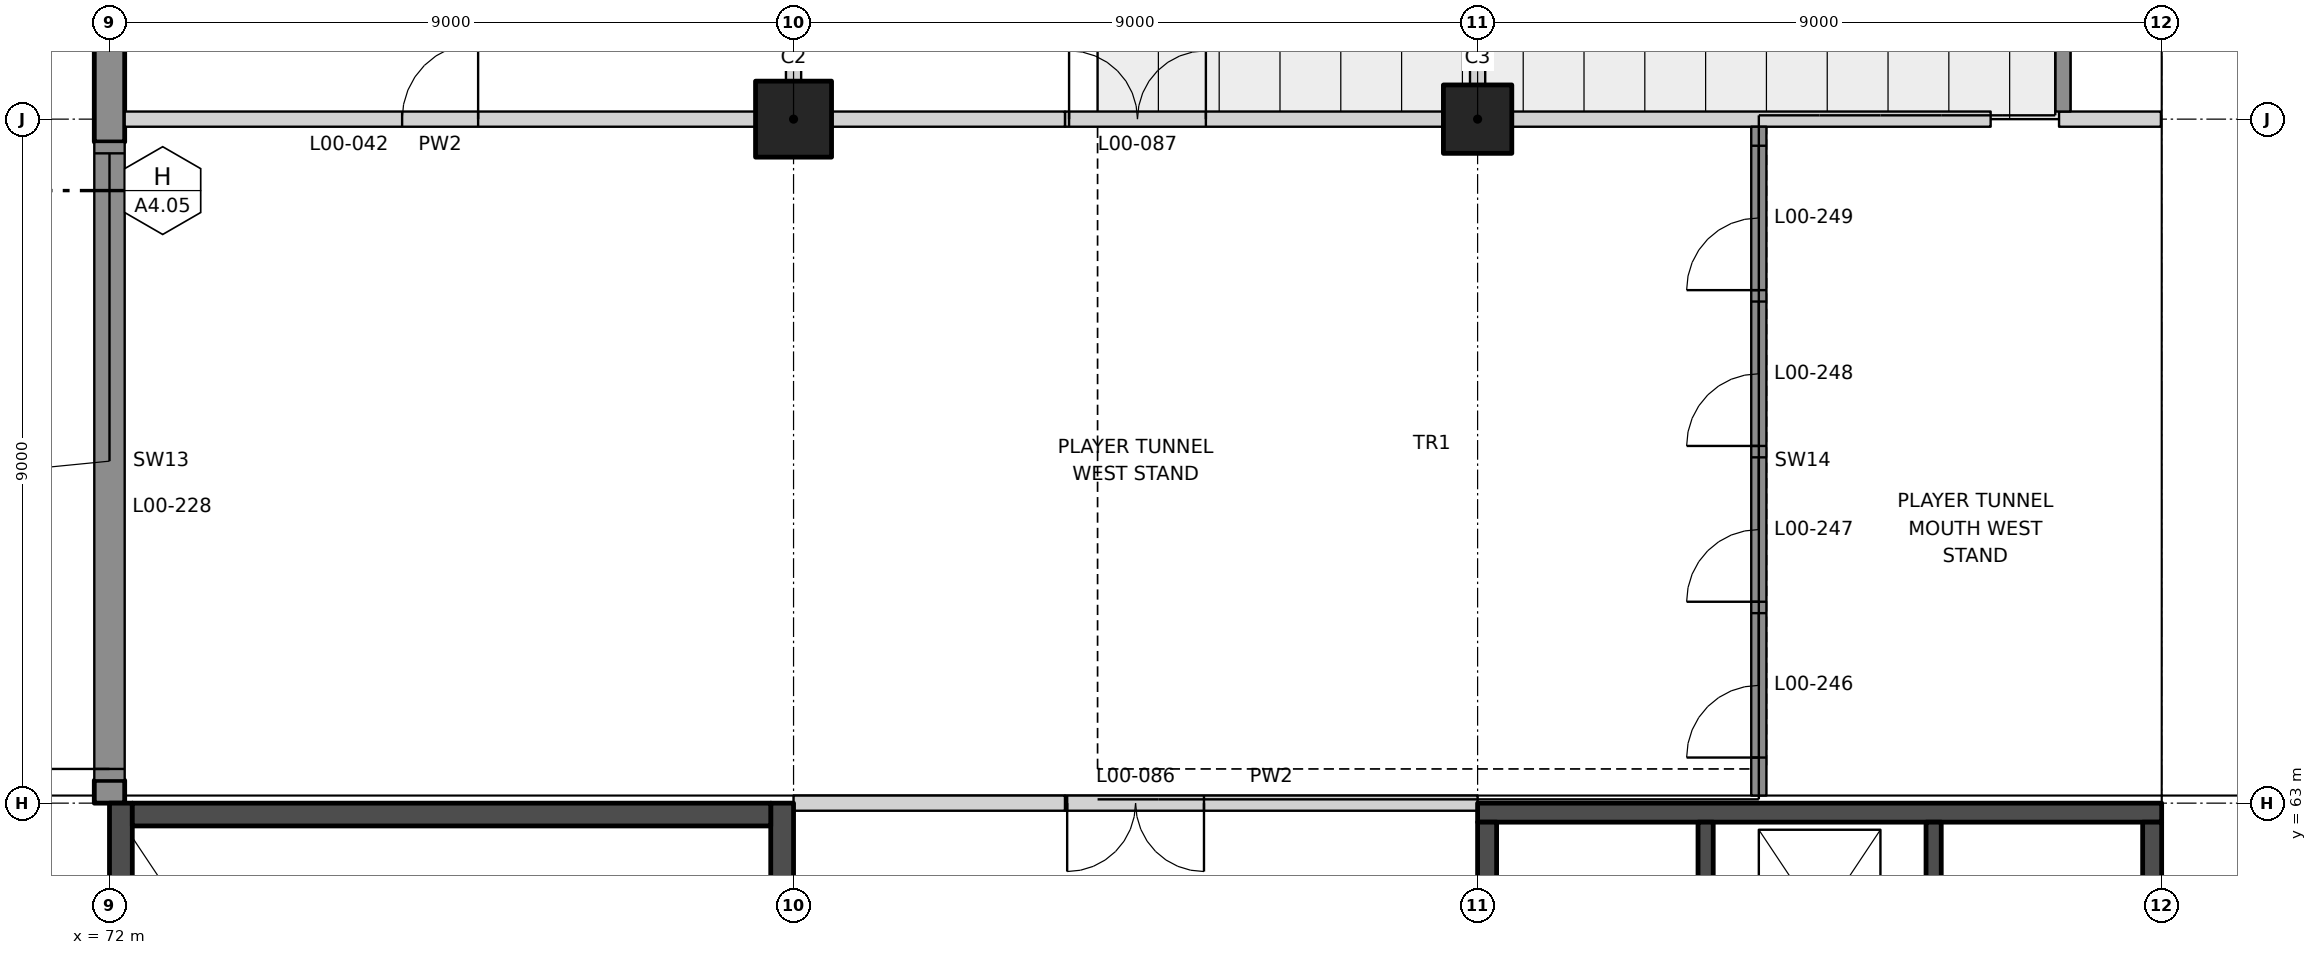
"""IFC4 building model, lengths in metres.
Left out: names, types, materials, properties, quantities, classifications, styles, units other than length and angle.
Written with IfcOpenShell. Run it as: python <this file> out.ifc"""

import sys

from ifc_helpers import new_model, si_unit, direction, frame, frame_2d, origin, origin_2d, place, context, subcontext, project, spatial, polyline, rectangle, outline, extrude, element, fill, save


model = new_model("IFC4")
c1 = context("Model", 3, precision=1e-05, world=origin(), true_north=direction((0.0, 1.0)))
c2 = subcontext(c1, "Body", "Model", "MODEL_VIEW")
j1 = project(units=[si_unit("LENGTHUNIT", "METRE"), si_unit("PLANEANGLEUNIT", "RADIAN")], contexts=[c1])
p1 = place(None, origin())
s1 = spatial("IfcSite", under=j1, at=p1, CompositionType="ELEMENT")
p2 = place(p1, origin())
s2 = spatial("IfcBuilding", under=s1, at=p2, CompositionType="ELEMENT")
p3 = place(p2, origin())
s3 = spatial("IfcBuildingStorey", under=s2, at=p3, CompositionType="ELEMENT", Elevation=0.0)
p4 = place(p3, frame((90.0, 72.0, 0.0), z_axis=(0.0, 0.0, 1.0), x_axis=(1.0, 0.0, 0.0)))
e1 = element("IfcColumn", 1, at=p4, inside=s3, PredefinedType="COLUMN", context=c2, shape_type="SweptSolid", body=[
    extrude(rectangle(XDim=0.9, YDim=0.9, at=origin_2d()), origin(), (0.0, 0.0, 1.0), 3.552),
])
p5 = place(p3, frame((81.0, 72.0, 0.0), z_axis=(0.0, 0.0, 1.0), x_axis=(1.0, 0.0, 0.0)))
e2 = element("IfcColumn", 2, at=p5, inside=s3, PredefinedType="COLUMN", context=c2, shape_type="SweptSolid", body=[
    extrude(rectangle(XDim=1.0, YDim=1.0, at=origin_2d()), origin(), (0.0, 0.0, 1.0), 7.0),
])
p6 = place(p3, frame((72.0, 99.0, 0.0), z_axis=(0.0, 0.0, 1.0), x_axis=(0.0, -1.0, 0.0)))
e3 = element("IfcWall", 3, at=p6, inside=s3, PredefinedType="SOLIDWALL", context=c2, shape_type="SweptSolid", body=[
    extrude(rectangle(XDim=27.3, YDim=0.4, at=frame_2d((13.65, 0.0))), origin(), (0.0, 0.0, 1.0), 7.0),
])
p7 = place(p3, frame((72.0, 63.3, 0.0), z_axis=(0.0, 0.0, 1.0), x_axis=(0.0, -1.0, 0.0)))
e4 = element("IfcWall", 4, at=p7, inside=s3, PredefinedType="SOLIDWALL", context=c2, shape_type="SweptSolid", body=[
    extrude(rectangle(XDim=0.3, YDim=0.4, at=frame_2d((0.15, 0.0))), origin(), (0.0, 0.0, 1.0), 7.0),
])
p8 = place(p3, frame((84.571, 63.0, 0.0), z_axis=(0.0, 0.0, 1.0), x_axis=(1.0, 0.0, 0.0)))
e5 = element("IfcWall", 5, at=p8, inside=s3, PredefinedType="PARTITIONING", context=c2, shape_type="SweptSolid", body=[
    extrude(rectangle(XDim=5.429, YDim=0.2, at=frame_2d((2.714, 0.0))), origin(), (0.0, 0.0, 1.0), 3.439),
])
p9 = place(p8, frame((0.029, 0.0, 0.0)))
e6 = element("IfcOpeningElement", 6, at=p9, cuts=e5, PredefinedType="OPENING", context=c2, shape_type="SweptSolid", body=[
    extrude(rectangle(XDim=1.8, YDim=2.1, at=frame_2d((0.9, 1.05))), frame((0.0, 0.11, 0.0), z_axis=(0.0, -1.0, 0.0), x_axis=(1.0, 0.0, 0.0)), (0.0, 0.0, 1.0), 0.22),
])
p10 = place(p3, frame((72.2, 72.0, 0.0), z_axis=(0.0, 0.0, 1.0), x_axis=(1.0, 0.0, 0.0)))
e7 = element("IfcWall", 7, at=p10, inside=s3, PredefinedType="PARTITIONING", context=c2, shape_type="SweptSolid", body=[
    extrude(rectangle(XDim=8.3, YDim=0.2, at=frame_2d((4.15, 0.0))), origin(), (0.0, 0.0, 1.0), 5.75),
])
p11 = place(p10, frame((3.65, 0.0, 0.0)))
e8 = element("IfcOpeningElement", 8, at=p11, cuts=e7, PredefinedType="OPENING", context=c2, shape_type="SweptSolid", body=[
    extrude(rectangle(XDim=1.0, YDim=2.1, at=frame_2d((0.5, 1.05))), frame((0.0, 0.11, 0.0), z_axis=(0.0, -1.0, 0.0), x_axis=(1.0, 0.0, 0.0)), (0.0, 0.0, 1.0), 0.22),
])
p12 = place(p3, frame((84.571, 72.0, 0.0), z_axis=(0.0, 0.0, 1.0), x_axis=(1.0, 0.0, 0.0)))
e9 = element("IfcWall", 9, at=p12, inside=s3, PredefinedType="PARTITIONING", context=c2, shape_type="SweptSolid", body=[
    extrude(rectangle(XDim=4.979, YDim=0.2, at=frame_2d((2.49, 0.0))), origin(), (0.0, 0.0, 1.0), 3.439),
])
p13 = place(p12, frame((0.054, 0.0, 0.0)))
e10 = element("IfcOpeningElement", 10, at=p13, cuts=e9, PredefinedType="OPENING", context=c2, shape_type="SweptSolid", body=[
    extrude(rectangle(XDim=1.8, YDim=2.1, at=frame_2d((0.9, 1.05))), frame((0.0, 0.11, 0.0), z_axis=(0.0, -1.0, 0.0), x_axis=(1.0, 0.0, 0.0)), (0.0, 0.0, 1.0), 0.22),
])
p14 = place(p3, frame((97.65, 72.0, 0.0), z_axis=(0.0, 0.0, 1.0), x_axis=(1.0, 0.0, 0.0)))
e11 = element("IfcWall", 11, at=p14, inside=s3, PredefinedType="PARTITIONING", context=c2, shape_type="SweptSolid", body=[
    extrude(outline(polyline([(0.0, 0.0), (1.34, 0.0), (1.34, 7.0), (0.447, 7.0), (0.0, -0.189), (0.0, 0.0)])), frame((0.0, 0.1, 0.0), z_axis=(0.0, -1.0, 0.0), x_axis=(1.0, 0.0, 0.0)), (0.0, 0.0, 1.0), 0.2),
])
p15 = place(p3, frame((90.45, 72.0, 0.0), z_axis=(0.0, 0.0, 1.0), x_axis=(1.0, 0.0, 0.0)))
e12 = element("IfcWall", 12, at=p15, inside=s3, PredefinedType="PARTITIONING", context=c2, shape_type="SweptSolid", body=[
    extrude(outline(polyline([(0.0, 0.0), (6.3, 0.0), (6.3, 0.239), (5.815, 0.469), (4.362, 1.159), (0.0, 3.231), (0.0, 0.0)])), frame((0.0, 0.1, 0.0), z_axis=(0.0, -1.0, 0.0), x_axis=(1.0, 0.0, 0.0)), (0.0, 0.0, 1.0), 0.2),
])
p16 = place(p3, frame((81.0, 72.5, 0.0), z_axis=(0.0, 0.0, 1.0), x_axis=(0.0, 1.0, 0.0)))
e13 = element("IfcWall", 13, at=p16, inside=s3, PredefinedType="PARTITIONING", context=c2, shape_type="SweptSolid", body=[
    extrude(rectangle(XDim=8.0, YDim=0.2, at=frame_2d((4.0, 0.0))), origin(), (0.0, 0.0, 1.0), 5.75),
])
p17 = place(p3, frame((90.0, 72.45, 0.0), z_axis=(0.0, 0.0, 1.0), x_axis=(0.0, 1.0, 0.0)))
e14 = element("IfcWall", 14, at=p17, inside=s3, PredefinedType="PARTITIONING", context=c2, shape_type="SweptSolid", body=[
    extrude(rectangle(XDim=8.1, YDim=0.2, at=frame_2d((4.05, 0.0))), origin(), (0.0, 0.0, 1.0), 4.445),
])
p18 = place(p3, frame((80.85, 63.0, 0.0), z_axis=(0.0, 0.0, 1.0), x_axis=(0.0, -1.0, 0.0)))
e15 = element("IfcWall", 15, at=p18, inside=s3, PredefinedType="SHEAR", context=c2, shape_type="SweptSolid", body=[
    extrude(rectangle(XDim=18.0, YDim=0.3, at=frame_2d((9.0, 0.0))), origin(), (0.0, 0.0, 1.0), 7.0),
])
p19 = place(p18, frame((8.6, 0.0, 0.0)))
e16 = element("IfcOpeningElement", 16, at=p19, cuts=e15, PredefinedType="OPENING", context=c2, shape_type="SweptSolid", body=[
    extrude(rectangle(XDim=1.2, YDim=2.1, at=frame_2d((0.6, 1.05))), frame((0.0, 0.16, 0.0), z_axis=(0.0, -1.0, 0.0), x_axis=(1.0, 0.0, 0.0)), (0.0, 0.0, 1.0), 0.32),
])
p20 = place(p3, frame((72.15, 63.0, 0.0), z_axis=(0.0, 0.0, 1.0), x_axis=(0.0, -1.0, 0.0)))
e17 = element("IfcWall", 17, at=p20, inside=s3, PredefinedType="SHEAR", context=c2, shape_type="SweptSolid", body=[
    extrude(rectangle(XDim=18.0, YDim=0.3, at=frame_2d((9.0, 0.0))), origin(), (0.0, 0.0, 1.0), 7.0),
])
p21 = place(p3, frame((80.7, 62.85, 0.0), z_axis=(0.0, 0.0, 1.0), x_axis=(-1.0, 0.0, 0.0)))
e18 = element("IfcWall", 18, at=p21, inside=s3, PredefinedType="SHEAR", context=c2, shape_type="SweptSolid", body=[
    extrude(rectangle(XDim=8.4, YDim=0.3, at=frame_2d((4.2, 0.0))), origin(), (0.0, 0.0, 1.0), 7.0),
])
p22 = place(p3, frame((90.0, 62.875, 0.0), z_axis=(0.0, 0.0, 1.0), x_axis=(1.0, 0.0, 0.0)))
e19 = element("IfcWall", 19, at=p22, inside=s3, PredefinedType="SHEAR", context=c2, shape_type="SweptSolid", body=[
    extrude(rectangle(XDim=9.0, YDim=0.25, at=frame_2d((4.5, 0.0))), origin(), (0.0, 0.0, 1.0), 7.0),
])
for number, where, z_axis, x_axis in (
    (20, (90.125, 60.25, 0.0), (0.0, 0.0, 1.0), (0.0, 1.0, 0.0)),
    (21, (98.875, 60.25, 0.0), (0.0, 0.0, 1.0), (0.0, 1.0, 0.0)),
):
    element("IfcWall", number, at=place(p3, frame(where, z_axis=z_axis, x_axis=x_axis)), inside=s3, PredefinedType="SHEAR", context=c2, shape_type="SweptSolid", body=[
        extrude(rectangle(XDim=2.5, YDim=0.25, at=frame_2d((1.25, 0.0))), origin(), (0.0, 0.0, 1.0), 7.0),
    ])
for number, where, z_axis, x_axis in (
    (22, (93.0, 60.25, 0.0), (0.0, 0.0, 1.0), (0.0, 1.0, 0.0)),
    (23, (96.0, 60.25, 0.0), (0.0, 0.0, 1.0), (0.0, 1.0, 0.0)),
):
    element("IfcWall", number, at=place(p3, frame(where, z_axis=z_axis, x_axis=x_axis)), inside=s3, PredefinedType="SHEAR", context=c2, shape_type="SweptSolid", body=[
        extrude(rectangle(XDim=2.5, YDim=0.2, at=frame_2d((1.25, 0.0))), origin(), (0.0, 0.0, 1.0), 7.0),
    ])
p23 = place(p3, frame((72.0, 63.3, 0.0), z_axis=(0.0, 0.0, 1.0), x_axis=(0.0, 1.0, 0.0)))
e24 = element("IfcWall", 24, at=p23, inside=s3, PredefinedType="SOLIDWALL", context=c2, shape_type="SweptSolid", body=[
    extrude(rectangle(XDim=8.4, YDim=0.4, at=frame_2d((4.2, 0.0))), origin(), (0.0, 0.0, 1.0), 5.0),
])
p24 = place(p23, frame((0.15, 0.0, 0.0)))
e25 = element("IfcOpeningElement", 25, at=p24, cuts=e24, PredefinedType="OPENING", context=c2, shape_type="SweptSolid", body=[
    extrude(rectangle(XDim=8.1, YDim=2.4, at=frame_2d((4.05, 1.2))), frame((0.0, 0.21, 0.0), z_axis=(0.0, -1.0, 0.0), x_axis=(1.0, 0.0, 0.0)), (0.0, 0.0, 1.0), 0.42),
])
p25 = place(p3, frame((93.7, 63.1, 0.0), z_axis=(0.0, 0.0, 1.0), x_axis=(0.0, 1.0, 0.0)))
e26 = element("IfcWall", 26, at=p25, inside=s3, PredefinedType="SOLIDWALL", context=c2, shape_type="SweptSolid", body=[
    extrude(rectangle(XDim=8.8, YDim=0.2, at=frame_2d((4.4, 0.0))), origin(), (0.0, 0.0, 1.0), 2.64),
])
p26 = place(p25, frame((0.5, 0.0, 0.0)))
e27 = element("IfcOpeningElement", 27, at=p26, cuts=e26, PredefinedType="OPENING", context=c2, shape_type="SweptSolid", body=[
    extrude(rectangle(XDim=1.9, YDim=2.1, at=frame_2d((0.95, 1.05))), frame((0.0, 0.11, 0.0), z_axis=(0.0, -1.0, 0.0), x_axis=(1.0, 0.0, 0.0)), (0.0, 0.0, 1.0), 0.22),
])
p27 = place(p25, frame((2.55, 0.0, 0.0)))
e28 = element("IfcOpeningElement", 28, at=p27, cuts=e26, PredefinedType="OPENING", context=c2, shape_type="SweptSolid", body=[
    extrude(rectangle(XDim=1.9, YDim=2.1, at=frame_2d((0.95, 1.05))), frame((0.0, 0.11, 0.0), z_axis=(0.0, -1.0, 0.0), x_axis=(1.0, 0.0, 0.0)), (0.0, 0.0, 1.0), 0.22),
])
p28 = place(p25, frame((4.6, 0.0, 0.0)))
e29 = element("IfcOpeningElement", 29, at=p28, cuts=e26, PredefinedType="OPENING", context=c2, shape_type="SweptSolid", body=[
    extrude(rectangle(XDim=1.9, YDim=2.1, at=frame_2d((0.95, 1.05))), frame((0.0, 0.11, 0.0), z_axis=(0.0, -1.0, 0.0), x_axis=(1.0, 0.0, 0.0)), (0.0, 0.0, 1.0), 0.22),
])
p29 = place(p25, frame((6.65, 0.0, 0.0)))
e30 = element("IfcOpeningElement", 30, at=p29, cuts=e26, PredefinedType="OPENING", context=c2, shape_type="SweptSolid", body=[
    extrude(rectangle(XDim=1.9, YDim=2.1, at=frame_2d((0.95, 1.05))), frame((0.0, 0.11, 0.0), z_axis=(0.0, -1.0, 0.0), x_axis=(1.0, 0.0, 0.0)), (0.0, 0.0, 1.0), 0.22),
])
p30 = place(p3, frame((97.7, 72.1, 0.0), z_axis=(0.0, 0.0, 1.0), x_axis=(0.0, 1.0, 0.0)))
e31 = element("IfcWall", 31, at=p30, inside=s3, PredefinedType="SOLIDWALL", context=c2, shape_type="SweptSolid", body=[
    extrude(rectangle(XDim=7.4, YDim=0.2, at=frame_2d((3.7, 0.0))), origin(), (0.0, 0.0, 1.0), 0.74),
])
p31 = place(p3, frame((81.0, 63.0, 0.0), z_axis=(0.0, 0.0, 1.0), x_axis=(1.0, 0.0, 0.0)))
e32 = element("IfcWall", 32, at=p31, inside=s3, PredefinedType="PARTITIONING", context=c2, shape_type="SweptSolid", body=[
    extrude(rectangle(XDim=3.571, YDim=0.2, at=frame_2d((1.786, 0.0))), origin(), (0.0, 0.0, 1.0), 5.65),
])
p32 = place(p3, frame((81.5, 72.0, 0.0), z_axis=(0.0, 0.0, 1.0), x_axis=(1.0, 0.0, 0.0)))
e33 = element("IfcWall", 33, at=p32, inside=s3, PredefinedType="PARTITIONING", context=c2, shape_type="SweptSolid", body=[
    extrude(rectangle(XDim=3.071, YDim=0.2, at=frame_2d((1.536, 0.0))), origin(), (0.0, 0.0, 1.0), 5.65),
])
p33 = place(p11, origin())
e34 = element("IfcDoor", 34, at=p33, inside=s3, OperationType="SINGLE_SWING_RIGHT", PredefinedType="DOOR", context=c2, shape_type="SweptSolid", body=[
    extrude(rectangle(XDim=1.0, YDim=2.1, at=frame_2d((0.5, 1.05))), frame((0.0, 0.025, 0.0), z_axis=(0.0, -1.0, 0.0), x_axis=(1.0, 0.0, 0.0)), (0.0, 0.0, 1.0), 0.05),
])
fill(e8, e34)
p34 = place(p9, frame((1.8, 0.0, 0.0), z_axis=(0.0, 0.0, 1.0), x_axis=(-1.0, 0.0, 0.0)))
e35 = element("IfcDoor", 35, at=p34, inside=s3, OperationType="DOUBLE_DOOR_DOUBLE_SWING", PredefinedType="DOOR", context=c2, shape_type="SweptSolid", body=[
    extrude(rectangle(XDim=1.8, YDim=2.1, at=frame_2d((0.9, 1.05))), frame((0.0, 0.025, 0.0), z_axis=(0.0, -1.0, 0.0), x_axis=(1.0, 0.0, 0.0)), (0.0, 0.0, 1.0), 0.05),
])
fill(e6, e35)
p35 = place(p13, origin())
e36 = element("IfcDoor", 36, at=p35, inside=s3, OperationType="DOUBLE_DOOR_DOUBLE_SWING", PredefinedType="DOOR", context=c2, shape_type="SweptSolid", body=[
    extrude(rectangle(XDim=1.8, YDim=2.1, at=frame_2d((0.9, 1.05))), frame((0.0, 0.025, 0.0), z_axis=(0.0, -1.0, 0.0), x_axis=(1.0, 0.0, 0.0)), (0.0, 0.0, 1.0), 0.05),
])
fill(e10, e36)
p36 = place(p24, origin())
e37 = element("IfcDoor", 37, at=p36, inside=s3, OperationType="DOUBLE_DOOR_SINGLE_SWING", PredefinedType="DOOR", context=c2, shape_type="SweptSolid", body=[
    extrude(rectangle(XDim=8.1, YDim=2.4, at=frame_2d((4.05, 1.2))), frame((0.0, 0.025, 0.0), z_axis=(0.0, -1.0, 0.0), x_axis=(1.0, 0.0, 0.0)), (0.0, 0.0, 1.0), 0.05),
])
fill(e25, e37)
p37 = place(p26, origin())
e38 = element("IfcDoor", 38, at=p37, inside=s3, OperationType="DOUBLE_DOOR_SINGLE_SWING", PredefinedType="DOOR", context=c2, shape_type="SweptSolid", body=[
    extrude(rectangle(XDim=1.9, YDim=2.1, at=frame_2d((0.95, 1.05))), frame((0.0, 0.025, 0.0), z_axis=(0.0, -1.0, 0.0), x_axis=(1.0, 0.0, 0.0)), (0.0, 0.0, 1.0), 0.05),
])
fill(e27, e38)
p38 = place(p27, origin())
e39 = element("IfcDoor", 39, at=p38, inside=s3, OperationType="DOUBLE_DOOR_SINGLE_SWING", PredefinedType="DOOR", context=c2, shape_type="SweptSolid", body=[
    extrude(rectangle(XDim=1.9, YDim=2.1, at=frame_2d((0.95, 1.05))), frame((0.0, 0.025, 0.0), z_axis=(0.0, -1.0, 0.0), x_axis=(1.0, 0.0, 0.0)), (0.0, 0.0, 1.0), 0.05),
])
fill(e28, e39)
p39 = place(p28, origin())
e40 = element("IfcDoor", 40, at=p39, inside=s3, OperationType="DOUBLE_DOOR_SINGLE_SWING", PredefinedType="DOOR", context=c2, shape_type="SweptSolid", body=[
    extrude(rectangle(XDim=1.9, YDim=2.1, at=frame_2d((0.95, 1.05))), frame((0.0, 0.025, 0.0), z_axis=(0.0, -1.0, 0.0), x_axis=(1.0, 0.0, 0.0)), (0.0, 0.0, 1.0), 0.05),
])
fill(e29, e40)
p40 = place(p29, origin())
e41 = element("IfcDoor", 41, at=p40, inside=s3, OperationType="DOUBLE_DOOR_SINGLE_SWING", PredefinedType="DOOR", context=c2, shape_type="SweptSolid", body=[
    extrude(rectangle(XDim=1.9, YDim=2.1, at=frame_2d((0.95, 1.05))), frame((0.0, 0.025, 0.0), z_axis=(0.0, -1.0, 0.0), x_axis=(1.0, 0.0, 0.0)), (0.0, 0.0, 1.0), 0.05),
])
fill(e30, e41)
save(model, sys.argv[1])
